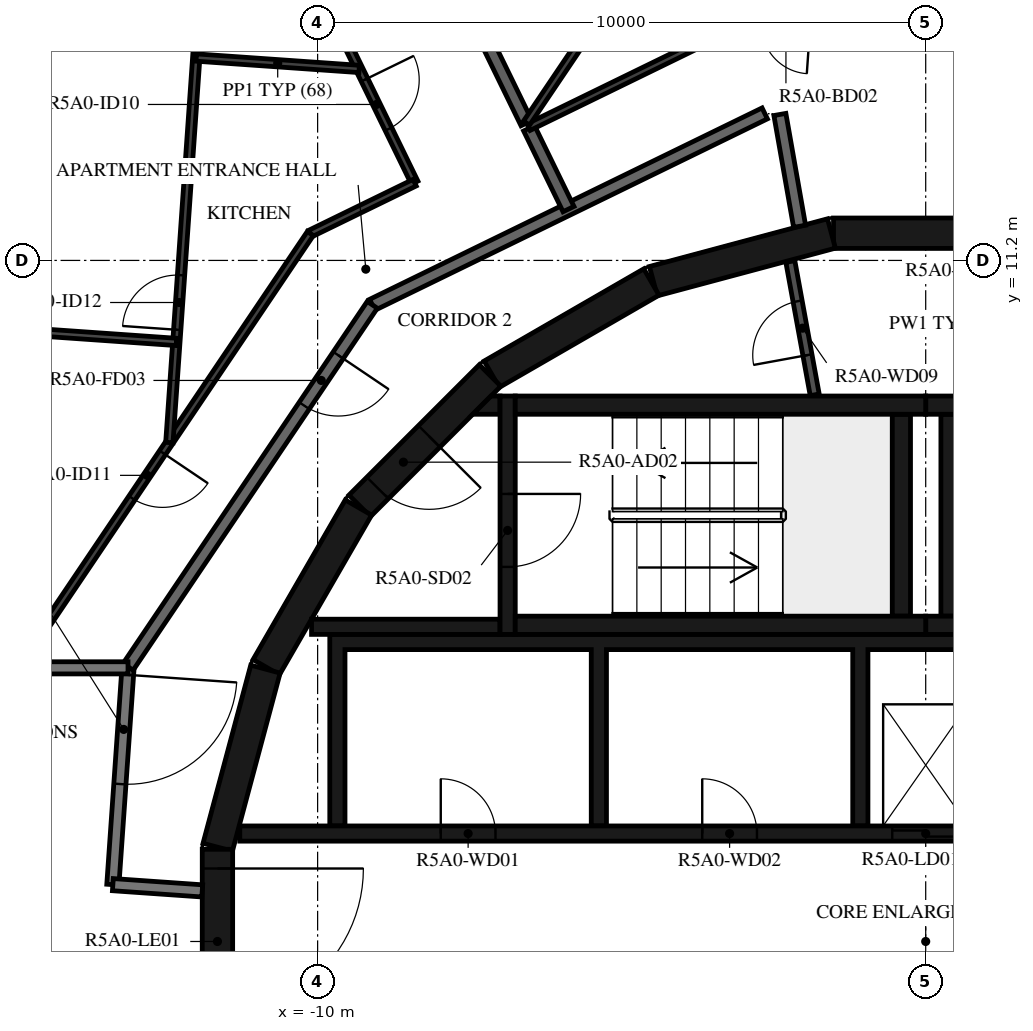
"""IFC4 building model, lengths in metres.
Left out: names, types, materials, properties, quantities, classifications, styles, units other than length and angle.
Written with IfcOpenShell. Run it as: python <this file> out.ifc"""

import sys

from ifc_helpers import new_model, si_unit, direction, frame, frame_2d, origin, place, context, subcontext, project, spatial, polyline, rectangle, outline, extrude, element, fill, save


model = new_model("IFC4")
c1 = context("Model", 3, precision=1e-05, world=origin(), true_north=direction((0.0, 1.0)))
c2 = subcontext(c1, "Body", "Model", "MODEL_VIEW")
j1 = project(units=[si_unit("LENGTHUNIT", "METRE"), si_unit("PLANEANGLEUNIT", "RADIAN")], contexts=[c1])
p1 = place(None, origin())
s1 = spatial("IfcSite", under=j1, at=p1, CompositionType="ELEMENT")
p2 = place(p1, origin())
s2 = spatial("IfcBuilding", under=s1, at=p2, CompositionType="ELEMENT")
p3 = place(p2, frame((0.0, 0.0, 195.4)))
s3 = spatial("IfcBuildingStorey", under=s2, at=p3, CompositionType="ELEMENT", Elevation=195.4)
for number, where, z_axis, x_axis in (
    (1, (1.516, 11.647, 0.0), (0.0, 0.0, 1.0), (-1.0, 0.0, 0.0)),
    (2, (-1.55, 11.643, 0.0), (0.0, 0.0, 1.0), (-0.966, -0.259, 0.0)),
    (3, (-4.51, 10.845, 0.0), (0.0, 0.0, 1.0), (-0.866, -0.5, 0.0)),
):
    element("IfcWall", number, at=place(p3, frame(where, z_axis=z_axis, x_axis=x_axis)), inside=s3, PredefinedType="SHEAR", context=c2, shape_type="SweptSolid", body=[
        extrude(rectangle(XDim=3.033, YDim=0.5, at=frame_2d((1.516, 0.0))), origin(), (0.0, 0.0, 1.0), 3.12),
    ])
p4 = place(p3, frame((-7.164, 9.308, 0.0), z_axis=(0.0, 0.0, 1.0), x_axis=(-0.707106781187, -0.707106781187, 0.0)))
e4 = element("IfcWall", 4, at=p4, inside=s3, PredefinedType="SHEAR", context=c2, shape_type="SweptSolid", body=[
    extrude(rectangle(XDim=3.032, YDim=0.5, at=frame_2d((1.516, 0.0))), origin(), (0.0, 0.0, 1.0), 3.12),
])
p5 = place(p4, frame((1.416, 0.0, 0.0)))
e5 = element("IfcOpeningElement", 5, at=p5, cuts=e4, PredefinedType="OPENING", context=c2, shape_type="SweptSolid", body=[
    extrude(rectangle(XDim=1.2, YDim=2.1, at=frame_2d((0.6, 1.05))), frame((0.0, 0.26, 0.0), z_axis=(0.0, -1.0, 0.0), x_axis=(1.0, 0.0, 0.0)), (0.0, 0.0, 1.0), 0.52),
])
for number, where, z_axis, x_axis in (
    (6, (-9.329, 7.137, 0.0), (0.0, 0.0, 1.0), (-0.5, -0.866, 0.0)),
    (7, (-10.858, 4.479, 0.0), (0.0, 0.0, 1.0), (-0.259, -0.966, 0.0)),
):
    element("IfcWall", number, at=place(p3, frame(where, z_axis=z_axis, x_axis=x_axis)), inside=s3, PredefinedType="SHEAR", context=c2, shape_type="SweptSolid", body=[
        extrude(rectangle(XDim=3.033, YDim=0.5, at=frame_2d((1.516, 0.0))), origin(), (0.0, 0.0, 1.0), 3.12),
    ])
p6 = place(p3, frame((-11.647, 1.516, 0.0), z_axis=(0.0, 0.0, 1.0), x_axis=(0.0, -1.0, 0.0)))
e8 = element("IfcWall", 8, at=p6, inside=s3, PredefinedType="SHEAR", context=c2, shape_type="SweptSolid", body=[
    extrude(rectangle(XDim=3.033, YDim=0.5, at=frame_2d((1.516, 0.0))), origin(), (0.0, 0.0, 1.0), 3.12),
])
p7 = place(p6, frame((0.316, 0.0, 0.0)))
e9 = element("IfcOpeningElement", 9, at=p7, cuts=e8, PredefinedType="OPENING", context=c2, shape_type="SweptSolid", body=[
    extrude(rectangle(XDim=2.4, YDim=2.1, at=frame_2d((1.2, 1.05))), frame((0.0, 0.26, 0.0), z_axis=(0.0, -1.0, 0.0), x_axis=(1.0, 0.0, 0.0)), (0.0, 0.0, 1.0), 0.52),
])
for number, where, z_axis, x_axis in (
    (10, (0.0, 5.2, 0.0), (0.0, 0.0, 1.0), (1.0, 0.0, 0.0)),
    (11, (0.0, 8.82, 0.0), (0.0, 0.0, 1.0), (1.0, 0.0, 0.0)),
):
    element("IfcWall", number, at=place(p3, frame(where, z_axis=z_axis, x_axis=x_axis)), inside=s3, PredefinedType="SHEAR", context=c2, shape_type="SweptSolid", body=[
        extrude(rectangle(XDim=6.75, YDim=0.3, at=frame_2d((3.375, 0.0))), origin(), (0.0, 0.0, 1.0), 3.12),
    ])
p8 = place(p3, frame((0.4, 5.35, 0.0), z_axis=(0.0, 0.0, 1.0), x_axis=(0.0, 1.0, 0.0)))
e12 = element("IfcWall", 12, at=p8, inside=s3, PredefinedType="SHEAR", context=c2, shape_type="SweptSolid", body=[
    extrude(rectangle(XDim=3.32, YDim=0.3, at=frame_2d((1.66, 0.0))), origin(), (0.0, 0.0, 1.0), 3.12),
])
for number, where, z_axis, x_axis in (
    (13, (-6.75, 5.2, 0.0), (0.0, 0.0, 1.0), (1.0, 0.0, 0.0)),
    (14, (-6.75, 8.82, 0.0), (0.0, 0.0, 1.0), (1.0, 0.0, 0.0)),
):
    element("IfcWall", number, at=place(p3, frame(where, z_axis=z_axis, x_axis=x_axis)), inside=s3, PredefinedType="SHEAR", context=c2, shape_type="SweptSolid", body=[
        extrude(rectangle(XDim=6.75, YDim=0.3, at=frame_2d((3.375, 0.0))), origin(), (0.0, 0.0, 1.0), 3.12),
    ])
p9 = place(p3, frame((-0.4, 5.35, 0.0), z_axis=(0.0, 0.0, 1.0), x_axis=(0.0, 1.0, 0.0)))
e15 = element("IfcWall", 15, at=p9, inside=s3, PredefinedType="SHEAR", context=c2, shape_type="SweptSolid", body=[
    extrude(rectangle(XDim=3.32, YDim=0.3, at=frame_2d((1.66, 0.0))), origin(), (0.0, 0.0, 1.0), 3.12),
])
p10 = place(p3, frame((-6.875, 8.97, 0.0), z_axis=(0.0, 0.0, 1.0), x_axis=(0.0, -1.0, 0.0)))
e16 = element("IfcWall", 16, at=p10, inside=s3, PredefinedType="SHEAR", context=c2, shape_type="SweptSolid", body=[
    extrude(rectangle(XDim=3.92, YDim=0.25, at=frame_2d((1.96, 0.0))), origin(), (0.0, 0.0, 1.0), 3.12),
])
p11 = place(p10, frame((1.61, 0.0, 0.0)))
e17 = element("IfcOpeningElement", 17, at=p11, cuts=e16, PredefinedType="OPENING", context=c2, shape_type="SweptSolid", body=[
    extrude(rectangle(XDim=1.2, YDim=2.1, at=frame_2d((0.6, 1.05))), frame((0.0, 0.135, 0.0), z_axis=(0.0, -1.0, 0.0), x_axis=(1.0, 0.0, 0.0)), (0.0, 0.0, 1.0), 0.27),
])
p12 = place(p3, frame((-7.0, 5.175, 0.0), z_axis=(0.0, 0.0, 1.0), x_axis=(-1.0, 0.0, 0.0)))
e18 = element("IfcWall", 18, at=p12, inside=s3, PredefinedType="SHEAR", context=c2, shape_type="SweptSolid", body=[
    extrude(rectangle(XDim=3.1, YDim=0.25, at=frame_2d((1.55, 0.0))), origin(), (0.0, 0.0, 1.0), 3.12),
])
p13 = place(p3, origin())
e19 = element("IfcWall", 19, at=p13, inside=s3, PredefinedType="SHEAR", context=c2, shape_type="SweptSolid", body=[
    extrude(outline(polyline([(-7.148, 8.97), (-7.0, 8.97), (-7.0, 8.67), (-7.448, 8.67), (-7.148, 8.97)])), origin(), (0.0, 0.0, 1.0), 3.12),
])
p14 = place(p3, origin())
e20 = element("IfcWall", 20, at=p14, inside=s3, PredefinedType="SHEAR", context=c2, shape_type="SweptSolid", body=[
    extrude(outline(polyline([(-9.55, 4.8), (-5.5, 4.8), (-5.5, 1.9), (-5.25, 1.9), (-5.25, 4.8), (-1.2, 4.8), (-1.2, 1.9), (-0.95, 1.9), (-0.95, 4.8), (0.95, 4.8), (0.95, 1.9), (1.2, 1.9), (1.2, 4.8), (3.1, 4.8), (3.1, 1.9), (3.35, 1.9), (3.35, 4.8), (5.25, 4.8), (5.25, 1.9), (5.5, 1.9), (5.5, 4.8), (7.4, 4.8), (7.4, 1.9), (7.65, 1.9), (7.65, 4.8), (9.55, 4.8), (9.55, 1.9), (9.8, 1.9), (9.8, 4.8), (9.8, 5.05), (-9.8, 5.05), (-9.8, 4.8), (-9.8, 1.9), (-9.55, 1.9), (-9.55, 4.8)])), origin(), (0.0, 0.0, 1.0), 3.12),
])
p15 = place(p3, frame((-11.28, 1.775, 0.0), z_axis=(0.0, 0.0, 1.0), x_axis=(1.0, 0.0, 0.0)))
e21 = element("IfcWall", 21, at=p15, inside=s3, PredefinedType="SHEAR", context=c2, shape_type="SweptSolid", body=[
    extrude(rectangle(XDim=14.38, YDim=0.25, at=frame_2d((7.19, 0.0))), origin(), (0.0, 0.0, 1.0), 3.12),
])
p16 = place(p15, frame((10.73, 0.0, 0.0)))
e22 = element("IfcOpeningElement", 22, at=p16, cuts=e21, PredefinedType="OPENING", context=c2, shape_type="SweptSolid", body=[
    extrude(rectangle(XDim=1.1, YDim=2.1, at=frame_2d((0.55, 1.05))), frame((0.0, 0.135, 0.0), z_axis=(0.0, -1.0, 0.0), x_axis=(1.0, 0.0, 0.0)), (0.0, 0.0, 1.0), 0.27),
])
p17 = place(p15, frame((12.88, 0.0, 0.0)))
e23 = element("IfcOpeningElement", 23, at=p17, cuts=e21, PredefinedType="OPENING", context=c2, shape_type="SweptSolid", body=[
    extrude(rectangle(XDim=1.1, YDim=2.1, at=frame_2d((0.55, 1.05))), frame((0.0, 0.135, 0.0), z_axis=(0.0, -1.0, 0.0), x_axis=(1.0, 0.0, 0.0)), (0.0, 0.0, 1.0), 0.27),
])
p18 = place(p15, frame((3.305, 0.0, 0.0)))
e24 = element("IfcOpeningElement", 24, at=p18, cuts=e21, PredefinedType="OPENING", context=c2, shape_type="SweptSolid", body=[
    extrude(rectangle(XDim=0.9, YDim=2.1, at=frame_2d((0.45, 1.05))), frame((0.0, 0.135, 0.0), z_axis=(0.0, -1.0, 0.0), x_axis=(1.0, 0.0, 0.0)), (0.0, 0.0, 1.0), 0.27),
])
p19 = place(p15, frame((7.605, 0.0, 0.0)))
e25 = element("IfcOpeningElement", 25, at=p19, cuts=e21, PredefinedType="OPENING", context=c2, shape_type="SweptSolid", body=[
    extrude(rectangle(XDim=0.9, YDim=2.1, at=frame_2d((0.45, 1.05))), frame((0.0, 0.135, 0.0), z_axis=(0.0, -1.0, 0.0), x_axis=(1.0, 0.0, 0.0)), (0.0, 0.0, 1.0), 0.27),
])
p20 = place(p3, frame((-1.825, 8.99, 0.0), z_axis=(0.0, 0.0, 1.0), x_axis=(-0.179955206115, 0.983674805915, 0.0)))
e26 = element("IfcWall", 26, at=p20, inside=s3, PredefinedType="PARTITIONING", context=c2, shape_type="SweptSolid", body=[
    extrude(rectangle(XDim=2.229, YDim=0.15, at=frame_2d((1.115, 0.0))), origin(), (0.0, 0.0, 1.0), 3.12),
])
p21 = place(p20, frame((0.665, 0.0, 0.0)))
e27 = element("IfcOpeningElement", 27, at=p21, cuts=e26, PredefinedType="OPENING", context=c2, shape_type="SweptSolid", body=[
    extrude(rectangle(XDim=0.9, YDim=2.1, at=frame_2d((0.45, 1.05))), frame((0.0, 0.085, 0.0), z_axis=(0.0, -1.0, 0.0), x_axis=(1.0, 0.0, 0.0)), (0.0, 0.0, 1.0), 0.17),
])
p22 = place(p3, frame((-13.118, 4.5, 0.0), z_axis=(0.0, 0.0, 1.0), x_axis=(-0.069746872611, -0.99756472159, 0.0)))
e28 = element("IfcWall", 28, at=p22, inside=s3, PredefinedType="STANDARD", context=c2, shape_type="SweptSolid", body=[
    extrude(rectangle(XDim=3.574, YDim=0.2, at=frame_2d((1.787, 0.0))), origin(), (0.0, 0.0, 1.0), 3.12),
])
p23 = place(p22, frame((0.115, 0.0, 0.0)))
e29 = element("IfcOpeningElement", 29, at=p23, cuts=e28, PredefinedType="OPENING", context=c2, shape_type="SweptSolid", body=[
    extrude(rectangle(XDim=1.8, YDim=2.1, at=frame_2d((0.9, 1.05))), frame((0.0, 0.11, 0.0), z_axis=(0.0, -1.0, 0.0), x_axis=(1.0, 0.0, 0.0)), (0.0, 0.0, 1.0), 0.22),
])
p24 = place(p3, frame((-13.367, 0.935, 0.0), z_axis=(0.0, 0.0, 1.0), x_axis=(0.997553656289, -0.069904955655, 0.0)))
e30 = element("IfcWall", 30, at=p24, inside=s3, PredefinedType="STANDARD", context=c2, shape_type="SweptSolid", body=[
    extrude(rectangle(XDim=1.474, YDim=0.2, at=frame_2d((0.737, 0.0))), origin(), (0.0, 0.0, 1.0), 3.12),
])
p25 = place(p3, frame((-2.074, 11.761, 0.0), z_axis=(0.0, 0.0, 1.0), x_axis=(-0.173740587112, 0.984791454263, 0.0)))
e31 = element("IfcWall", 31, at=p25, inside=s3, PredefinedType="STANDARD", context=c2, shape_type="SweptSolid", body=[
    extrude(rectangle(XDim=1.867, YDim=0.2, at=frame_2d((0.934, 0.0))), origin(), (0.0, 0.0, 1.0), 3.12),
])
p26 = place(p3, frame((-2.647, 13.618, 0.0), z_axis=(0.0, 0.0, 1.0), x_axis=(-0.898796543751, -0.438366026218, 0.0)))
e32 = element("IfcWall", 32, at=p26, inside=s3, PredefinedType="STANDARD", context=c2, shape_type="SweptSolid", body=[
    extrude(rectangle(XDim=7.181, YDim=0.2, at=frame_2d((3.591, 0.0))), origin(), (0.0, 0.0, 1.0), 3.12),
])
p27 = place(p3, frame((-9.101, 10.47, 0.0), z_axis=(0.0, 0.0, 1.0), x_axis=(-0.559195469534, -0.829035841718, 0.0)))
e33 = element("IfcWall", 33, at=p27, inside=s3, PredefinedType="STANDARD", context=c2, shape_type="SweptSolid", body=[
    extrude(rectangle(XDim=7.181, YDim=0.2, at=frame_2d((3.591, 0.0))), origin(), (0.0, 0.0, 1.0), 3.12),
])
p28 = place(p27, frame((1.0, 0.0, 0.0)))
e34 = element("IfcOpeningElement", 34, at=p28, cuts=e33, PredefinedType="OPENING", context=c2, shape_type="SweptSolid", body=[
    extrude(rectangle(XDim=1.0, YDim=2.1, at=frame_2d((0.5, 1.05))), frame((0.0, 0.11, 0.0), z_axis=(0.0, -1.0, 0.0), x_axis=(1.0, 0.0, 0.0)), (0.0, 0.0, 1.0), 0.22),
])
p29 = place(p3, frame((-13.118, 4.5, 0.0), z_axis=(0.0, 0.0, 1.0), x_axis=(-1.0, 0.0, 0.0)))
e35 = element("IfcWall", 35, at=p29, inside=s3, PredefinedType="STANDARD", context=c2, shape_type="SweptSolid", body=[
    extrude(rectangle(XDim=4.782, YDim=0.2, at=frame_2d((2.391, 0.0))), origin(), (0.0, 0.0, 1.0), 3.12),
])
p30 = place(p3, frame((-6.522, 13.373, 0.0), z_axis=(0.0, 0.0, 1.0), x_axis=(0.438277270821, -0.8988398266, 0.0)))
e36 = element("IfcWall", 36, at=p30, inside=s3, PredefinedType="STANDARD", context=c2, shape_type="SweptSolid", body=[
    extrude(rectangle(XDim=1.479, YDim=0.2, at=frame_2d((0.74, 0.0))), origin(), (0.0, 0.0, 1.0), 3.12),
])
p31 = place(p3, frame((-8.219, 16.851, 0.0), z_axis=(0.0, 0.0, 1.0), x_axis=(0.438291091101, -0.898833087654, 0.0)))
e37 = element("IfcWall", 37, at=p31, inside=s3, PredefinedType="STANDARD", context=c2, shape_type="SweptSolid", body=[
    extrude(rectangle(XDim=3.774, YDim=0.2, at=frame_2d((1.887, 0.0))), origin(), (0.0, 0.0, 1.0), 3.12),
])
p32 = place(p3, frame((5.022, 14.585, 0.0), z_axis=(0.0, 0.0, 1.0), x_axis=(-0.997565118395, 0.069741197017, 0.0)))
e38 = element("IfcWall", 38, at=p32, inside=s3, PredefinedType="PARTITIONING", context=c2, shape_type="SweptSolid", body=[
    extrude(rectangle(XDim=7.985, YDim=0.12, at=frame_2d((3.993, 0.0))), origin(), (0.0, 0.0, 1.0), 3.12),
])
p33 = place(p32, frame((2.875, 0.0, 0.0)))
e39 = element("IfcOpeningElement", 39, at=p33, cuts=e38, PredefinedType="OPENING", context=c2, shape_type="SweptSolid", body=[
    extrude(rectangle(XDim=0.9, YDim=2.1, at=frame_2d((0.45, 1.05))), frame((0.0, 0.07, 0.0), z_axis=(0.0, -1.0, 0.0), x_axis=(1.0, 0.0, 0.0)), (0.0, 0.0, 1.0), 0.14),
])
p34 = place(p32, frame((6.938, 0.0, 0.0)))
e40 = element("IfcOpeningElement", 40, at=p34, cuts=e38, PredefinedType="OPENING", context=c2, shape_type="SweptSolid", body=[
    extrude(rectangle(XDim=0.8, YDim=2.1, at=frame_2d((0.4, 1.05))), frame((0.0, 0.07, 0.0), z_axis=(0.0, -1.0, 0.0), x_axis=(1.0, 0.0, 0.0)), (0.0, 0.0, 1.0), 0.14),
])
p35 = place(p3, frame((-2.943, 15.142, 0.0), z_axis=(0.0, 0.0, 1.0), x_axis=(-0.89881075705, -0.438336883014, 0.0)))
e41 = element("IfcWall", 41, at=p35, inside=s3, PredefinedType="PARTITIONING", context=c2, shape_type="SweptSolid", body=[
    extrude(rectangle(XDim=3.992, YDim=0.12, at=frame_2d((1.996, 0.0))), origin(), (0.0, 0.0, 1.0), 3.12),
])
p36 = place(p3, frame((-3.939, 17.35, 0.0), z_axis=(0.0, 0.0, 1.0), x_axis=(-0.559193216274, -0.829037361566, 0.0)))
e42 = element("IfcWall", 42, at=p36, inside=s3, PredefinedType="PARTITIONING", context=c2, shape_type="SweptSolid", body=[
    extrude(rectangle(XDim=4.694, YDim=0.12, at=frame_2d((2.347, 0.0))), origin(), (0.0, 0.0, 1.0), 3.12),
])
p37 = place(p3, frame((-10.5, 16.775, 0.0), z_axis=(0.0, 0.0, 1.0), x_axis=(0.438345136783, -0.898806731761, 0.0)))
e43 = element("IfcWall", 43, at=p37, inside=s3, PredefinedType="PARTITIONING", context=c2, shape_type="SweptSolid", body=[
    extrude(rectangle(XDim=4.78, YDim=0.12, at=frame_2d((2.39, 0.0))), origin(), (0.0, 0.0, 1.0), 3.12),
])
p38 = place(p37, frame((0.7, 0.0, 0.0)))
e44 = element("IfcOpeningElement", 44, at=p38, cuts=e43, PredefinedType="OPENING", context=c2, shape_type="SweptSolid", body=[
    extrude(rectangle(XDim=0.8, YDim=2.1, at=frame_2d((0.4, 1.05))), frame((0.0, 0.07, 0.0), z_axis=(0.0, -1.0, 0.0), x_axis=(1.0, 0.0, 0.0)), (0.0, 0.0, 1.0), 0.14),
])
p39 = place(p37, frame((2.899, 0.0, 0.0)))
e45 = element("IfcOpeningElement", 45, at=p39, cuts=e43, PredefinedType="OPENING", context=c2, shape_type="SweptSolid", body=[
    extrude(rectangle(XDim=0.9, YDim=2.1, at=frame_2d((0.45, 1.05))), frame((0.0, 0.07, 0.0), z_axis=(0.0, -1.0, 0.0), x_axis=(1.0, 0.0, 0.0)), (0.0, 0.0, 1.0), 0.14),
])
p40 = place(p3, frame((-8.405, 12.479, 0.0), z_axis=(0.0, 0.0, 1.0), x_axis=(-0.898784427692, -0.438390867307, 0.0)))
e46 = element("IfcWall", 46, at=p40, inside=s3, PredefinedType="PARTITIONING", context=c2, shape_type="SweptSolid", body=[
    extrude(rectangle(XDim=1.908, YDim=0.12, at=frame_2d((0.954, 0.0))), origin(), (0.0, 0.0, 1.0), 3.12),
])
p41 = place(p3, frame((-10.12, 11.642, 0.0), z_axis=(0.0, 0.0, 1.0), x_axis=(-0.55920080659, -0.829032241779, 0.0)))
e47 = element("IfcWall", 47, at=p41, inside=s3, PredefinedType="PARTITIONING", context=c2, shape_type="SweptSolid", body=[
    extrude(rectangle(XDim=7.985, YDim=0.12, at=frame_2d((3.992, 0.0))), origin(), (0.0, 0.0, 1.0), 3.12),
])
p42 = place(p41, frame((4.346, 0.0, 0.0)))
e48 = element("IfcOpeningElement", 48, at=p42, cuts=e47, PredefinedType="OPENING", context=c2, shape_type="SweptSolid", body=[
    extrude(rectangle(XDim=0.9, YDim=2.1, at=frame_2d((0.45, 1.05))), frame((0.0, 0.07, 0.0), z_axis=(0.0, -1.0, 0.0), x_axis=(1.0, 0.0, 0.0)), (0.0, 0.0, 1.0), 0.14),
])
p43 = place(p3, frame((-12.439, 8.204, 0.0), z_axis=(0.0, 0.0, 1.0), x_axis=(0.069750037523, 0.997564500303, 0.0)))
e49 = element("IfcWall", 49, at=p43, inside=s3, PredefinedType="PARTITIONING", context=c2, shape_type="SweptSolid", body=[
    extrude(rectangle(XDim=10.014, YDim=0.12, at=frame_2d((5.007, 0.0))), origin(), (0.0, 0.0, 1.0), 3.12),
])
p44 = place(p43, frame((1.859, 0.0, 0.0)))
e50 = element("IfcOpeningElement", 50, at=p44, cuts=e49, PredefinedType="OPENING", context=c2, shape_type="SweptSolid", body=[
    extrude(rectangle(XDim=0.9, YDim=2.1, at=frame_2d((0.45, 1.05))), frame((0.0, 0.07, 0.0), z_axis=(0.0, -1.0, 0.0), x_axis=(1.0, 0.0, 0.0)), (0.0, 0.0, 1.0), 0.14),
])
p45 = place(p3, frame((-11.996, 14.536, 0.0), z_axis=(0.0, 0.0, 1.0), x_axis=(0.997565991425, -0.069728708231, 0.0)))
e51 = element("IfcWall", 51, at=p45, inside=s3, PredefinedType="PARTITIONING", context=c2, shape_type="SweptSolid", body=[
    extrude(rectangle(XDim=2.686, YDim=0.12, at=frame_2d((1.343, 0.0))), origin(), (0.0, 0.0, 1.0), 3.12),
])
p46 = place(p3, frame((-17.51, 10.222, 0.0), z_axis=(0.0, 0.0, 1.0), x_axis=(0.997563184303, -0.069768856397, 0.0)))
e52 = element("IfcWall", 52, at=p46, inside=s3, PredefinedType="PARTITIONING", context=c2, shape_type="SweptSolid", body=[
    extrude(rectangle(XDim=5.2, YDim=0.12, at=frame_2d((2.6, 0.0))), origin(), (0.0, 0.0, 1.0), 2.73),
])
p47 = place(p11, origin())
e53 = element("IfcDoor", 53, at=p47, inside=s3, OperationType="SINGLE_SWING_LEFT", PredefinedType="DOOR", context=c2, shape_type="SweptSolid", body=[
    extrude(rectangle(XDim=1.2, YDim=2.1, at=frame_2d((0.6, 1.05))), frame((0.0, 0.025, 0.0), z_axis=(0.0, -1.0, 0.0), x_axis=(1.0, 0.0, 0.0)), (0.0, 0.0, 1.0), 0.05),
])
fill(e17, e53)
p48 = place(p5, origin())
e54 = element("IfcDoor", 54, at=p48, inside=s3, OperationType="SINGLE_SWING_RIGHT", PredefinedType="DOOR", context=c2, shape_type="SweptSolid", body=[
    extrude(rectangle(XDim=1.2, YDim=2.1, at=frame_2d((0.6, 1.05))), frame((0.0, 0.025, 0.0), z_axis=(0.0, -1.0, 0.0), x_axis=(1.0, 0.0, 0.0)), (0.0, 0.0, 1.0), 0.05),
])
fill(e5, e54)
p49 = place(p7, origin())
e55 = element("IfcDoor", 55, at=p49, inside=s3, OperationType="DOUBLE_DOOR_SINGLE_SWING", PredefinedType="DOOR", context=c2, shape_type="SweptSolid", body=[
    extrude(rectangle(XDim=2.4, YDim=2.1, at=frame_2d((1.2, 1.05))), frame((0.0, 0.025, 0.0), z_axis=(0.0, -1.0, 0.0), x_axis=(1.0, 0.0, 0.0)), (0.0, 0.0, 1.0), 0.05),
])
fill(e9, e55)
p50 = place(p16, origin())
e56 = element("IfcDoor", 56, at=p50, inside=s3, OperationType="DOUBLE_DOOR_SLIDING", PredefinedType="DOOR", context=c2, shape_type="SweptSolid", body=[
    extrude(rectangle(XDim=1.1, YDim=2.1, at=frame_2d((0.55, 1.05))), frame((0.0, 0.025, 0.0), z_axis=(0.0, -1.0, 0.0), x_axis=(1.0, 0.0, 0.0)), (0.0, 0.0, 1.0), 0.05),
])
fill(e22, e56)
p51 = place(p18, origin())
e57 = element("IfcDoor", 57, at=p51, inside=s3, OperationType="SINGLE_SWING_LEFT", PredefinedType="DOOR", context=c2, shape_type="SweptSolid", body=[
    extrude(rectangle(XDim=0.9, YDim=2.1, at=frame_2d((0.45, 1.05))), frame((0.0, 0.025, 0.0), z_axis=(0.0, -1.0, 0.0), x_axis=(1.0, 0.0, 0.0)), (0.0, 0.0, 1.0), 0.05),
])
fill(e24, e57)
p52 = place(p19, origin())
e58 = element("IfcDoor", 58, at=p52, inside=s3, OperationType="SINGLE_SWING_RIGHT", PredefinedType="DOOR", context=c2, shape_type="SweptSolid", body=[
    extrude(rectangle(XDim=0.9, YDim=2.1, at=frame_2d((0.45, 1.05))), frame((0.0, 0.025, 0.0), z_axis=(0.0, -1.0, 0.0), x_axis=(1.0, 0.0, 0.0)), (0.0, 0.0, 1.0), 0.05),
])
fill(e25, e58)
p53 = place(p21, origin())
e59 = element("IfcDoor", 59, at=p53, inside=s3, OperationType="SINGLE_SWING_LEFT", PredefinedType="DOOR", context=c2, shape_type="SweptSolid", body=[
    extrude(rectangle(XDim=0.9, YDim=2.1, at=frame_2d((0.45, 1.05))), frame((0.0, 0.025, 0.0), z_axis=(0.0, -1.0, 0.0), x_axis=(1.0, 0.0, 0.0)), (0.0, 0.0, 1.0), 0.05),
])
fill(e27, e59)
p54 = place(p28, origin())
e60 = element("IfcDoor", 60, at=p54, inside=s3, OperationType="SINGLE_SWING_LEFT", PredefinedType="DOOR", context=c2, shape_type="SweptSolid", body=[
    extrude(rectangle(XDim=1.0, YDim=2.1, at=frame_2d((0.5, 1.05))), frame((0.0, 0.025, 0.0), z_axis=(0.0, -1.0, 0.0), x_axis=(1.0, 0.0, 0.0)), (0.0, 0.0, 1.0), 0.05),
])
fill(e34, e60)
p55 = place(p39, origin())
e61 = element("IfcDoor", 61, at=p55, inside=s3, OperationType="SINGLE_SWING_LEFT", PredefinedType="DOOR", context=c2, shape_type="SweptSolid", body=[
    extrude(rectangle(XDim=0.9, YDim=2.1, at=frame_2d((0.45, 1.05))), frame((0.0, 0.025, 0.0), z_axis=(0.0, -1.0, 0.0), x_axis=(1.0, 0.0, 0.0)), (0.0, 0.0, 1.0), 0.05),
])
fill(e45, e61)
p56 = place(p42, origin())
e62 = element("IfcDoor", 62, at=p56, inside=s3, OperationType="SINGLE_SWING_LEFT", PredefinedType="DOOR", context=c2, shape_type="SweptSolid", body=[
    extrude(rectangle(XDim=0.9, YDim=2.1, at=frame_2d((0.45, 1.05))), frame((0.0, 0.025, 0.0), z_axis=(0.0, -1.0, 0.0), x_axis=(1.0, 0.0, 0.0)), (0.0, 0.0, 1.0), 0.05),
])
fill(e48, e62)
p57 = place(p44, origin())
e63 = element("IfcDoor", 63, at=p57, inside=s3, OperationType="SINGLE_SWING_LEFT", PredefinedType="DOOR", context=c2, shape_type="SweptSolid", body=[
    extrude(rectangle(XDim=0.9, YDim=2.1, at=frame_2d((0.45, 1.05))), frame((0.0, 0.025, 0.0), z_axis=(0.0, -1.0, 0.0), x_axis=(1.0, 0.0, 0.0)), (0.0, 0.0, 1.0), 0.05),
])
fill(e50, e63)
p58 = place(p23, origin())
e64 = element("IfcDoor", 64, at=p58, inside=s3, OperationType="DOUBLE_DOOR_SINGLE_SWING", PredefinedType="DOOR", context=c2, shape_type="SweptSolid", body=[
    extrude(rectangle(XDim=1.8, YDim=2.1, at=frame_2d((0.9, 1.05))), frame((0.0, 0.025, 0.0), z_axis=(0.0, -1.0, 0.0), x_axis=(1.0, 0.0, 0.0)), (0.0, 0.0, 1.0), 0.05),
])
fill(e29, e64)
save(model, sys.argv[1])
